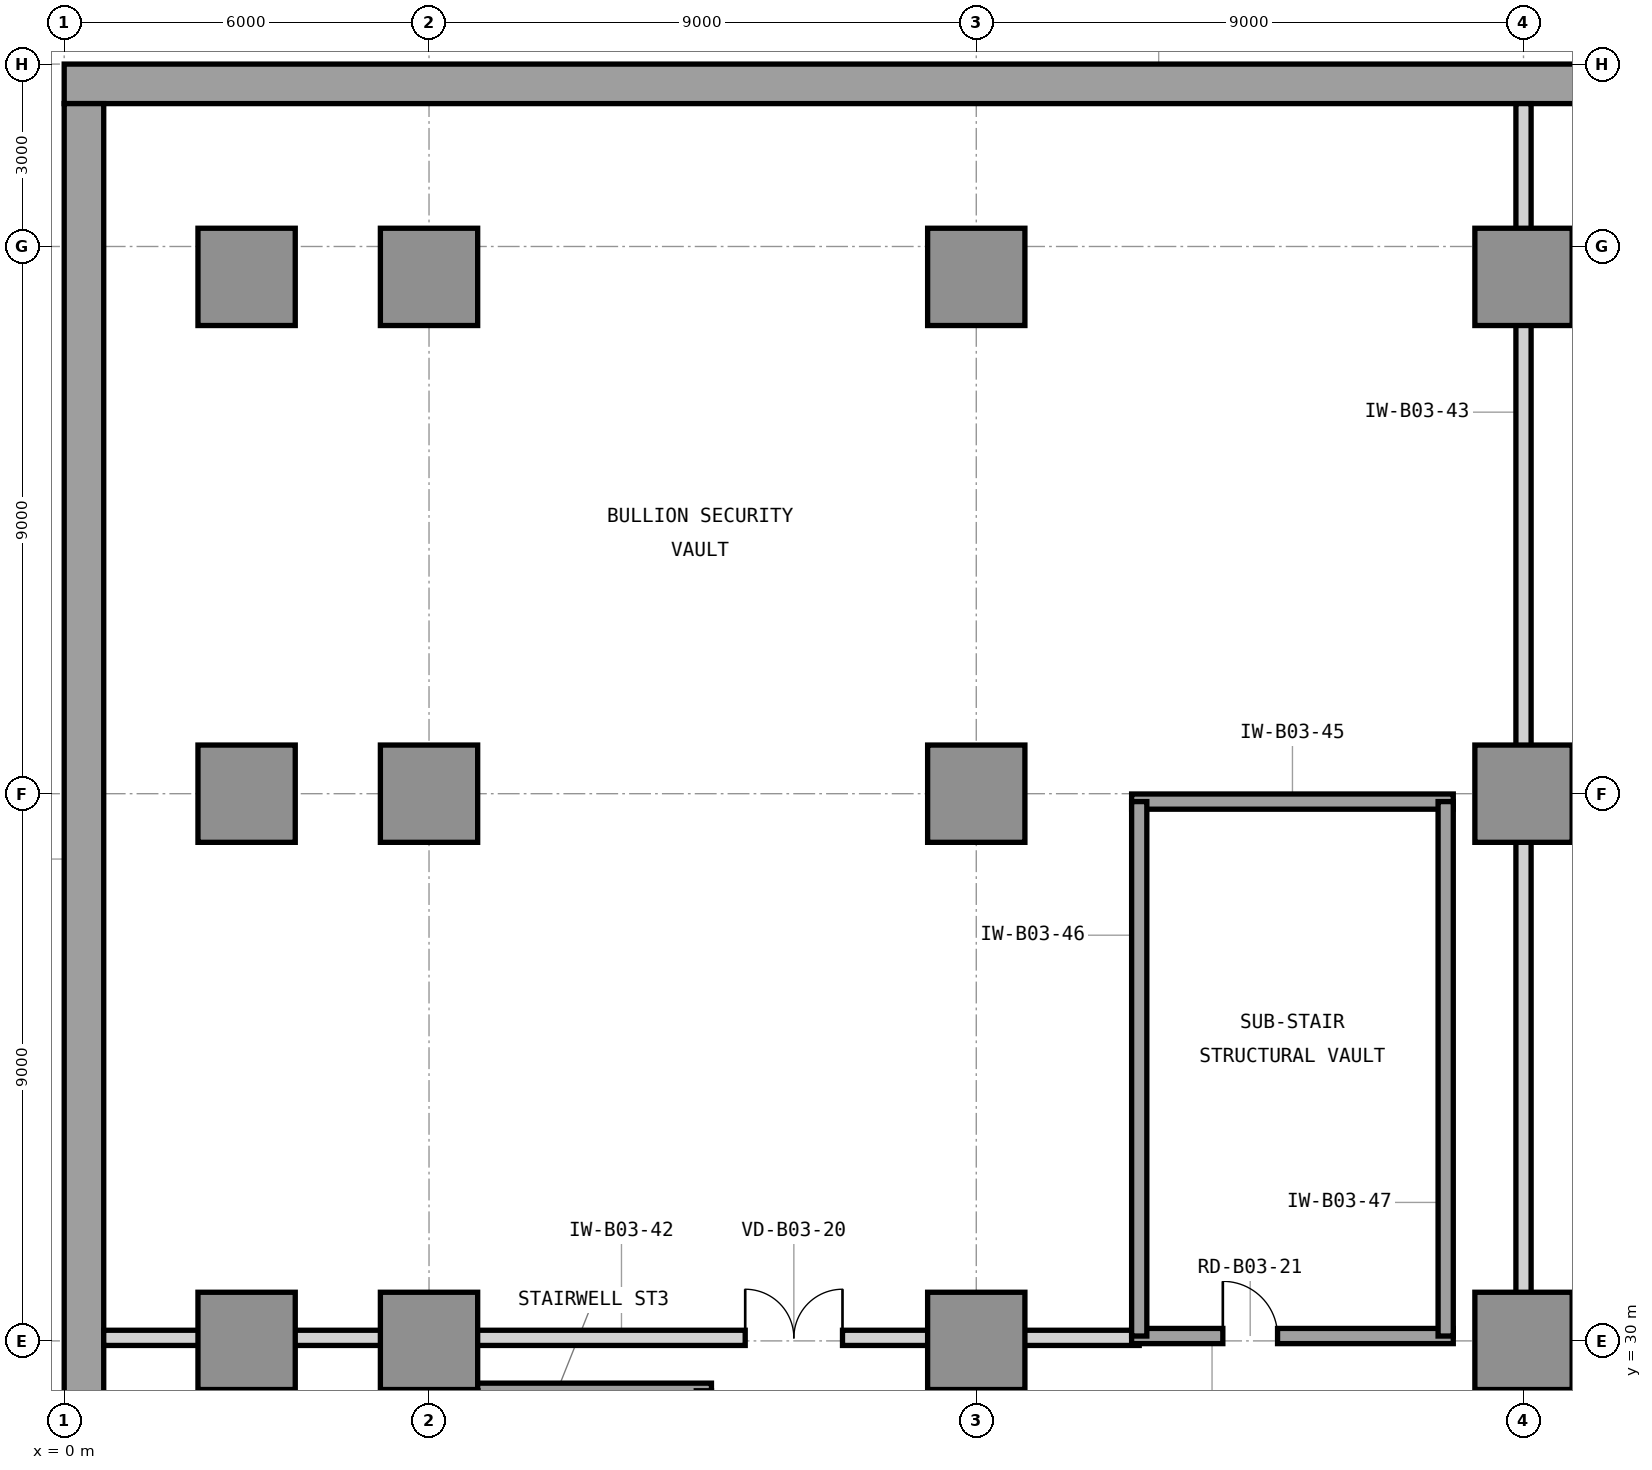
"""IFC4 building model, lengths in metres.
Left out: names, types, materials, properties, quantities, classifications, styles, units other than length and angle.
Written with IfcOpenShell. Run it as: python <this file> out.ifc"""

import sys

from ifc_helpers import new_model, si_unit, direction, frame, frame_2d, origin, origin_2d, place, context, subcontext, project, spatial, rectangle, extrude, element, fill, save


model = new_model("IFC4")
c1 = context("Model", 3, precision=1e-05, world=origin(), true_north=direction((0.0, 1.0)))
c2 = subcontext(c1, "Body", "Model", "MODEL_VIEW")
j1 = project(units=[si_unit("LENGTHUNIT", "METRE"), si_unit("PLANEANGLEUNIT", "RADIAN")], contexts=[c1])
p1 = place(None, origin())
s1 = spatial("IfcSite", under=j1, at=p1, CompositionType="ELEMENT")
p2 = place(p1, origin())
s2 = spatial("IfcBuilding", under=s1, at=p2, CompositionType="ELEMENT")
p3 = place(p2, frame((0.0, 0.0, -13.5)))
s3 = spatial("IfcBuildingStorey", under=s2, at=p3, CompositionType="ELEMENT", Elevation=-13.5)
p4 = place(p3, frame((72.0, 50.675, 0.0), z_axis=(0.0, 0.0, 1.0), x_axis=(-1.0, 0.0, 0.0)))
e1 = element("IfcWall", 1, at=p4, inside=s3, PredefinedType="USERDEFINED", context=c2, shape_type="SweptSolid", body=[
    extrude(rectangle(XDim=72.0, YDim=0.65, at=frame_2d((36.0, 0.0))), origin(), (0.0, 0.0, 1.0), 4.5),
])
p5 = place(p3, frame((0.325, 50.35, 0.0), z_axis=(0.0, 0.0, 1.0), x_axis=(0.0, -1.0, 0.0)))
e2 = element("IfcWall", 2, at=p5, inside=s3, PredefinedType="USERDEFINED", context=c2, shape_type="SweptSolid", body=[
    extrude(rectangle(XDim=49.7, YDim=0.65, at=frame_2d((24.85, 0.0))), origin(), (0.0, 0.0, 1.0), 4.5),
])
for number, where, z_axis, x_axis in (
    (3, (3.0, 30.0, 0.0), (0.0, 0.0, 1.0), (1.0, 0.0, 0.0)),
    (4, (3.0, 39.0, 0.0), (0.0, 0.0, 1.0), (1.0, 0.0, 0.0)),
    (5, (3.0, 47.5, 0.0), (0.0, 0.0, 1.0), (1.0, 0.0, 0.0)),
    (6, (6.0, 30.0, 0.0), (0.0, 0.0, 1.0), (1.0, 0.0, 0.0)),
    (7, (6.0, 39.0, 0.0), (0.0, 0.0, 1.0), (1.0, 0.0, 0.0)),
    (8, (6.0, 47.5, 0.0), (0.0, 0.0, 1.0), (1.0, 0.0, 0.0)),
    (9, (15.0, 30.0, 0.0), (0.0, 0.0, 1.0), (1.0, 0.0, 0.0)),
    (10, (15.0, 39.0, 0.0), (0.0, 0.0, 1.0), (1.0, 0.0, 0.0)),
    (11, (15.0, 47.5, 0.0), (0.0, 0.0, 1.0), (1.0, 0.0, 0.0)),
    (12, (24.0, 30.0, 0.0), (0.0, 0.0, 1.0), (1.0, 0.0, 0.0)),
    (13, (24.0, 39.0, 0.0), (0.0, 0.0, 1.0), (1.0, 0.0, 0.0)),
    (14, (24.0, 47.5, 0.0), (0.0, 0.0, 1.0), (1.0, 0.0, 0.0)),
):
    element("IfcColumn", number, at=place(p3, frame(where, z_axis=z_axis, x_axis=x_axis)), inside=s3, PredefinedType="COLUMN", context=c2, shape_type="SweptSolid", body=[
        extrude(rectangle(XDim=1.6, YDim=1.6, at=origin_2d()), origin(), (0.0, 0.0, 1.0), 4.5),
    ])
p6 = place(p3, frame((6.555, 29.18, 0.0), z_axis=(0.0, 0.0, 1.0), x_axis=(1.0, 0.0, 0.0)))
e15 = element("IfcWall", 15, at=p6, inside=s3, PredefinedType="SHEAR", context=c2, shape_type="SweptSolid", body=[
    extrude(rectangle(XDim=4.09, YDim=0.25, at=frame_2d((2.045, 0.0))), origin(), (0.0, 0.0, 1.0), 4.5),
])
p7 = place(p3, frame((0.65, 30.05, 0.0), z_axis=(0.0, 0.0, 1.0), x_axis=(1.0, 0.0, 0.0)))
e16 = element("IfcWall", 16, at=p7, inside=s3, PredefinedType="PARTITIONING", context=c2, shape_type="SweptSolid", body=[
    extrude(rectangle(XDim=17.03, YDim=0.25, at=frame_2d((8.515, 0.0))), origin(), (0.0, 0.0, 1.0), 3.2),
])
p8 = place(p7, frame((10.55, 0.0, 0.0)))
e17 = element("IfcOpeningElement", 17, at=p8, cuts=e16, PredefinedType="OPENING", context=c2, shape_type="SweptSolid", body=[
    extrude(rectangle(XDim=1.6, YDim=2.3, at=frame_2d((0.8, 1.15))), frame((0.0, 0.135, 0.0), z_axis=(0.0, -1.0, 0.0), x_axis=(1.0, 0.0, 0.0)), (0.0, 0.0, 1.0), 0.27),
])
p9 = place(p3, frame((24.0, 30.05, 0.0), z_axis=(0.0, 0.0, 1.0), x_axis=(0.0, 1.0, 0.0)))
e18 = element("IfcWall", 18, at=p9, inside=s3, PredefinedType="PARTITIONING", context=c2, shape_type="SweptSolid", body=[
    extrude(rectangle(XDim=20.3, YDim=0.25, at=frame_2d((10.15, 0.0))), origin(), (0.0, 0.0, 1.0), 3.2),
])
p10 = place(p3, frame((17.555, 30.08, 0.0), z_axis=(0.0, 0.0, 1.0), x_axis=(1.0, 0.0, 0.0)))
e19 = element("IfcWall", 19, at=p10, inside=s3, PredefinedType="SHEAR", context=c2, shape_type="SweptSolid", body=[
    extrude(rectangle(XDim=5.29, YDim=0.25, at=frame_2d((2.645, 0.0))), origin(), (0.0, 0.0, 1.0), 4.5),
])
p11 = place(p10, frame((1.5, 0.0, 0.0)))
e20 = element("IfcOpeningElement", 20, at=p11, cuts=e19, PredefinedType="OPENING", context=c2, shape_type="SweptSolid", body=[
    extrude(rectangle(XDim=0.9, YDim=2.1, at=frame_2d((0.45, 1.05))), frame((0.0, 0.135, 0.0), z_axis=(0.0, -1.0, 0.0), x_axis=(1.0, 0.0, 0.0)), (0.0, 0.0, 1.0), 0.27),
])
p12 = place(p3, frame((17.555, 38.87, 0.0), z_axis=(0.0, 0.0, 1.0), x_axis=(1.0, 0.0, 0.0)))
e21 = element("IfcWall", 21, at=p12, inside=s3, PredefinedType="SHEAR", context=c2, shape_type="SweptSolid", body=[
    extrude(rectangle(XDim=5.29, YDim=0.25, at=frame_2d((2.645, 0.0))), origin(), (0.0, 0.0, 1.0), 4.5),
])
for number, where, z_axis, x_axis in (
    (22, (17.68, 30.08, 0.0), (0.0, 0.0, 1.0), (0.0, 1.0, 0.0)),
    (23, (22.72, 30.08, 0.0), (0.0, 0.0, 1.0), (0.0, 1.0, 0.0)),
):
    element("IfcWall", number, at=place(p3, frame(where, z_axis=z_axis, x_axis=x_axis)), inside=s3, PredefinedType="SHEAR", context=c2, shape_type="SweptSolid", body=[
        extrude(rectangle(XDim=8.79, YDim=0.25, at=frame_2d((4.395, 0.0))), origin(), (0.0, 0.0, 1.0), 4.5),
    ])
p13 = place(p8, origin())
e24 = element("IfcDoor", 24, at=p13, inside=s3, OperationType="DOUBLE_DOOR_SINGLE_SWING", PredefinedType="DOOR", context=c2, shape_type="SweptSolid", body=[
    extrude(rectangle(XDim=1.6, YDim=2.3, at=frame_2d((0.8, 1.15))), frame((0.0, 0.025, 0.0), z_axis=(0.0, -1.0, 0.0), x_axis=(1.0, 0.0, 0.0)), (0.0, 0.0, 1.0), 0.05),
])
fill(e17, e24)
p14 = place(p11, origin())
e25 = element("IfcDoor", 25, at=p14, inside=s3, OperationType="SINGLE_SWING_LEFT", PredefinedType="TRAPDOOR", context=c2, shape_type="SweptSolid", body=[
    extrude(rectangle(XDim=0.9, YDim=2.1, at=frame_2d((0.45, 1.05))), frame((0.0, 0.025, 0.0), z_axis=(0.0, -1.0, 0.0), x_axis=(1.0, 0.0, 0.0)), (0.0, 0.0, 1.0), 0.05),
])
fill(e20, e25)
save(model, sys.argv[1])
